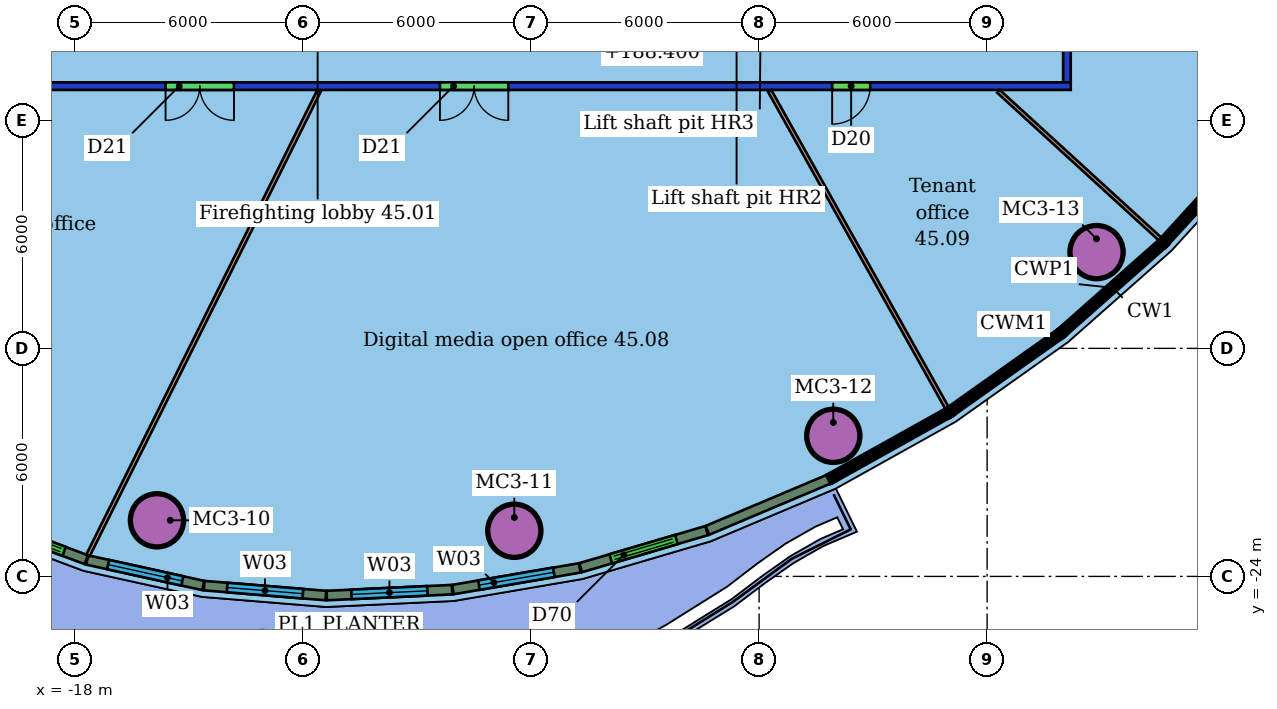
"""IFC4 building model, lengths in metres.
Left out: names, types, materials, properties, quantities, classifications, styles, units other than length and angle.
Written with IfcOpenShell. Run it as: python <this file> out.ifc"""

import sys

from ifc_helpers import new_model, si_unit, direction, frame, frame_2d, origin, origin_2d, place, context, subcontext, project, spatial, rectangle, hollow_circle, extrude, element, fill, save


model = new_model("IFC4")
c1 = context("Model", 3, precision=1e-05, world=origin(), true_north=direction((0.0, 1.0)))
c2 = subcontext(c1, "Body", "Model", "MODEL_VIEW")
j1 = project(units=[si_unit("LENGTHUNIT", "METRE"), si_unit("PLANEANGLEUNIT", "RADIAN")], contexts=[c1])
p1 = place(None, origin())
s1 = spatial("IfcSite", under=j1, at=p1, CompositionType="ELEMENT")
p2 = place(p1, origin())
s2 = spatial("IfcBuilding", under=s1, at=p2, CompositionType="ELEMENT")
p3 = place(p2, frame((0.0, 0.0, 186.6)))
s3 = spatial("IfcBuildingStorey", under=s2, at=p3, CompositionType="ELEMENT", Elevation=186.6)
for number, where, z_axis, x_axis in (
    (1, (-15.845, -22.524, 0.0), (0.0, 0.0, 1.0), (1.0, 0.0, 0.0)),
    (2, (-6.442, -22.8, 0.0), (0.0, 0.0, 1.0), (1.0, 0.0, 0.0)),
    (3, (1.952, -20.301, 0.0), (0.0, 0.0, 1.0), (1.0, 0.0, 0.0)),
    (4, (8.879, -15.467, 0.0), (0.0, 0.0, 1.0), (1.0, 0.0, 0.0)),
):
    element("IfcColumn", number, at=place(p3, frame(where, z_axis=z_axis, x_axis=x_axis)), inside=s3, PredefinedType="COLUMN", context=c2, shape_type="SweptSolid", body=[
        extrude(hollow_circle(Radius=0.7, WallThickness=0.05, at=origin_2d()), origin(), (0.0, 0.0, 1.0), 3.4),
    ])
p4 = place(p3, frame((8.2, -11.1, 0.0), z_axis=(0.0, 0.0, 1.0), x_axis=(-1.0, 0.0, 0.0)))
e5 = element("IfcWall", 5, at=p4, inside=s3, PredefinedType="PARTITIONING", context=c2, shape_type="SweptSolid", body=[
    extrude(rectangle(XDim=28.4, YDim=0.2, at=frame_2d((14.2, 0.0))), origin(), (0.0, 0.0, 1.0), 3.0),
])
p5 = place(p4, frame((22.019, 0.0, 0.0)))
e6 = element("IfcOpeningElement", 6, at=p5, cuts=e5, PredefinedType="OPENING", context=c2, shape_type="SweptSolid", body=[
    extrude(rectangle(XDim=1.8, YDim=2.1, at=frame_2d((0.9, 1.05))), frame((0.0, 0.11, 0.0), z_axis=(0.0, -1.0, 0.0), x_axis=(1.0, 0.0, 0.0)), (0.0, 0.0, 1.0), 0.22),
])
p6 = place(p4, frame((14.8, 0.0, 0.0)))
e7 = element("IfcOpeningElement", 7, at=p6, cuts=e5, PredefinedType="OPENING", context=c2, shape_type="SweptSolid", body=[
    extrude(rectangle(XDim=1.8, YDim=2.1, at=frame_2d((0.9, 1.05))), frame((0.0, 0.11, 0.0), z_axis=(0.0, -1.0, 0.0), x_axis=(1.0, 0.0, 0.0)), (0.0, 0.0, 1.0), 0.22),
])
p7 = place(p4, frame((5.278, 0.0, 0.0)))
e8 = element("IfcOpeningElement", 8, at=p7, cuts=e5, PredefinedType="OPENING", context=c2, shape_type="SweptSolid", body=[
    extrude(rectangle(XDim=1.0, YDim=2.1, at=frame_2d((0.5, 1.05))), frame((0.0, 0.11, 0.0), z_axis=(0.0, -1.0, 0.0), x_axis=(1.0, 0.0, 0.0)), (0.0, 0.0, 1.0), 0.22),
])
p8 = place(p3, frame((8.1, 11.0, 0.0), z_axis=(0.0, 0.0, 1.0), x_axis=(0.0, -1.0, 0.0)))
e9 = element("IfcWall", 9, at=p8, inside=s3, PredefinedType="PARTITIONING", context=c2, shape_type="SweptSolid", body=[
    extrude(rectangle(XDim=22.0, YDim=0.2, at=frame_2d((11.0, 0.0))), origin(), (0.0, 0.0, 1.0), 3.0),
])
p9 = place(p8, frame((11.641, 0.0, 0.0)))
e10 = element("IfcOpeningElement", 10, at=p9, cuts=e9, PredefinedType="OPENING", context=c2, shape_type="SweptSolid", body=[
    extrude(rectangle(XDim=1.8, YDim=2.1, at=frame_2d((0.9, 1.05))), frame((0.0, 0.11, 0.0), z_axis=(0.0, -1.0, 0.0), x_axis=(1.0, 0.0, 0.0)), (0.0, 0.0, 1.0), 0.22),
])
p10 = place(p8, frame((5.099, 0.0, 0.0)))
e11 = element("IfcOpeningElement", 11, at=p10, cuts=e9, PredefinedType="OPENING", context=c2, shape_type="SweptSolid", body=[
    extrude(rectangle(XDim=1.0, YDim=2.1, at=frame_2d((0.5, 1.05))), frame((0.0, 0.11, 0.0), z_axis=(0.0, -1.0, 0.0), x_axis=(1.0, 0.0, 0.0)), (0.0, 0.0, 1.0), 0.22),
])
p11 = place(p3, frame((-17.659, -23.445, 0.0), z_axis=(0.0, 0.0, 1.0), x_axis=(0.445259511275, 0.8954015678, 0.0)))
e12 = element("IfcWall", 12, at=p11, inside=s3, PredefinedType="PARTITIONING", context=c2, shape_type="SweptSolid", body=[
    extrude(rectangle(XDim=13.651, YDim=0.1, at=frame_2d((6.825, 0.0))), origin(), (0.0, 0.0, 1.0), 3.4),
])
p12 = place(p3, frame((4.945, -19.571, 0.0), z_axis=(0.0, 0.0, 1.0), x_axis=(-0.488111992878, 0.872781004839, 0.0)))
e13 = element("IfcWall", 13, at=p12, inside=s3, PredefinedType="PARTITIONING", context=c2, shape_type="SweptSolid", body=[
    extrude(rectangle(XDim=9.563, YDim=0.1, at=frame_2d((4.782, 0.0))), origin(), (0.0, 0.0, 1.0), 3.4),
])
p13 = place(p3, frame((10.555, -15.125, 0.0), z_axis=(0.0, 0.0, 1.0), x_axis=(-0.738257150839, 0.674519369058, 0.0)))
e14 = element("IfcWall", 14, at=p13, inside=s3, PredefinedType="PARTITIONING", context=c2, shape_type="SweptSolid", body=[
    extrude(rectangle(XDim=5.765, YDim=0.1, at=frame_2d((2.882, 0.0))), origin(), (0.0, 0.0, 1.0), 3.4),
])
p14 = place(p3, frame((-20.558, -22.491, 0.0), z_axis=(0.0, 0.0, 1.0), x_axis=(0.936302820001, -0.351193720413, 0.0)))
e15 = element("IfcWall", 15, at=p14, inside=s3, PredefinedType="SOLIDWALL", context=c2, shape_type="SweptSolid", body=[
    extrude(rectangle(XDim=3.046, YDim=0.25, at=frame_2d((1.523, 0.0))), origin(), (0.0, 0.0, 1.0), 3.05),
])
p15 = place(p14, frame((0.623, 0.0, 0.0)))
e16 = element("IfcOpeningElement", 16, at=p15, cuts=e15, PredefinedType="OPENING", context=c2, shape_type="SweptSolid", body=[
    extrude(rectangle(XDim=1.8, YDim=2.4, at=frame_2d((0.9, 1.2))), frame((0.0, 0.135, 0.0), z_axis=(0.0, -1.0, 0.0), x_axis=(1.0, 0.0, 0.0)), (0.0, 0.0, 1.0), 0.27),
])
p16 = place(p3, frame((-17.681, -23.568, 0.0), z_axis=(0.0, 0.0, 1.0), x_axis=(0.976666093786, -0.214763454175, 0.0)))
e17 = element("IfcWall", 17, at=p16, inside=s3, PredefinedType="SOLIDWALL", context=c2, shape_type="SweptSolid", body=[
    extrude(rectangle(XDim=3.126, YDim=0.25, at=frame_2d((1.563, 0.0))), origin(), (0.0, 0.0, 1.0), 3.05),
])
p17 = place(p16, frame((0.563, 0.0, 0.9)))
e18 = element("IfcOpeningElement", 18, at=p17, cuts=e17, PredefinedType="OPENING", context=c2, shape_type="SweptSolid", body=[
    extrude(rectangle(XDim=2.0, YDim=2.1, at=frame_2d((1.0, 1.05))), frame((0.0, 0.135, 0.0), z_axis=(0.0, -1.0, 0.0), x_axis=(1.0, 0.0, 0.0)), (0.0, 0.0, 1.0), 0.27),
])
p18 = place(p3, frame((-14.604, -24.243, 0.0), z_axis=(0.0, 0.0, 1.0), x_axis=(0.996696549615, -0.081215688051, 0.0)))
e19 = element("IfcWall", 19, at=p18, inside=s3, PredefinedType="SOLIDWALL", context=c2, shape_type="SweptSolid", body=[
    extrude(rectangle(XDim=3.213, YDim=0.25, at=frame_2d((1.607, 0.0))), origin(), (0.0, 0.0, 1.0), 3.05),
])
p19 = place(p18, frame((0.607, 0.0, 0.9)))
e20 = element("IfcOpeningElement", 20, at=p19, cuts=e19, PredefinedType="OPENING", context=c2, shape_type="SweptSolid", body=[
    extrude(rectangle(XDim=2.0, YDim=2.1, at=frame_2d((1.0, 1.05))), frame((0.0, 0.135, 0.0), z_axis=(0.0, -1.0, 0.0), x_axis=(1.0, 0.0, 0.0)), (0.0, 0.0, 1.0), 0.27),
])
p20 = place(p3, frame((-11.377, -24.504, 0.0), z_axis=(0.0, 0.0, 1.0), x_axis=(0.998890112475, 0.047101413994, 0.0)))
e21 = element("IfcWall", 21, at=p20, inside=s3, PredefinedType="SOLIDWALL", context=c2, shape_type="SweptSolid", body=[
    extrude(rectangle(XDim=3.302, YDim=0.25, at=frame_2d((1.651, 0.0))), origin(), (0.0, 0.0, 1.0), 3.05),
])
p21 = place(p20, frame((0.651, 0.0, 0.9)))
e22 = element("IfcOpeningElement", 22, at=p21, cuts=e21, PredefinedType="OPENING", context=c2, shape_type="SweptSolid", body=[
    extrude(rectangle(XDim=2.0, YDim=2.1, at=frame_2d((1.0, 1.05))), frame((0.0, 0.135, 0.0), z_axis=(0.0, -1.0, 0.0), x_axis=(1.0, 0.0, 0.0)), (0.0, 0.0, 1.0), 0.27),
])
p22 = place(p3, frame((-8.056, -24.346, 0.0), z_axis=(0.0, 0.0, 1.0), x_axis=(0.985711019597, 0.168445201314, 0.0)))
e23 = element("IfcWall", 23, at=p22, inside=s3, PredefinedType="SOLIDWALL", context=c2, shape_type="SweptSolid", body=[
    extrude(rectangle(XDim=3.384, YDim=0.25, at=frame_2d((1.692, 0.0))), origin(), (0.0, 0.0, 1.0), 3.05),
])
p23 = place(p22, frame((0.692, 0.0, 0.9)))
e24 = element("IfcOpeningElement", 24, at=p23, cuts=e23, PredefinedType="OPENING", context=c2, shape_type="SweptSolid", body=[
    extrude(rectangle(XDim=2.0, YDim=2.1, at=frame_2d((1.0, 1.05))), frame((0.0, 0.135, 0.0), z_axis=(0.0, -1.0, 0.0), x_axis=(1.0, 0.0, 0.0)), (0.0, 0.0, 1.0), 0.27),
])
p24 = place(p3, frame((-4.698, -23.771, 0.0), z_axis=(0.0, 0.0, 1.0), x_axis=(0.959327255186, 0.28229632916, 0.0)))
e25 = element("IfcWall", 25, at=p24, inside=s3, PredefinedType="SOLIDWALL", context=c2, shape_type="SweptSolid", body=[
    extrude(rectangle(XDim=3.457, YDim=0.25, at=frame_2d((1.729, 0.0))), origin(), (0.0, 0.0, 1.0), 3.05),
])
p25 = place(p24, frame((0.828, 0.0, 0.0)))
e26 = element("IfcOpeningElement", 26, at=p25, cuts=e25, PredefinedType="OPENING", context=c2, shape_type="SweptSolid", body=[
    extrude(rectangle(XDim=1.8, YDim=2.4, at=frame_2d((0.9, 1.2))), frame((0.0, 0.135, 0.0), z_axis=(0.0, -1.0, 0.0), x_axis=(1.0, 0.0, 0.0)), (0.0, 0.0, 1.0), 0.27),
])
p26 = place(p3, frame((-1.361, -22.788, 0.0), z_axis=(0.0, 0.0, 1.0), x_axis=(0.921468444672, 0.388453221733, 0.0)))
e27 = element("IfcWall", 27, at=p26, inside=s3, PredefinedType="SOLIDWALL", context=c2, shape_type="SweptSolid", body=[
    extrude(rectangle(XDim=3.47, YDim=0.25, at=frame_2d((1.735, 0.0))), origin(), (0.0, 0.0, 1.0), 3.05),
])
p27 = place(p5, origin())
e28 = element("IfcDoor", 28, at=p27, inside=s3, OperationType="DOUBLE_DOOR_SINGLE_SWING", PredefinedType="DOOR", context=c2, shape_type="SweptSolid", body=[
    extrude(rectangle(XDim=1.8, YDim=2.1, at=frame_2d((0.9, 1.05))), frame((0.0, 0.025, 0.0), z_axis=(0.0, -1.0, 0.0), x_axis=(1.0, 0.0, 0.0)), (0.0, 0.0, 1.0), 0.05),
])
fill(e6, e28)
p28 = place(p6, origin())
e29 = element("IfcDoor", 29, at=p28, inside=s3, OperationType="DOUBLE_DOOR_SINGLE_SWING", PredefinedType="DOOR", context=c2, shape_type="SweptSolid", body=[
    extrude(rectangle(XDim=1.8, YDim=2.1, at=frame_2d((0.9, 1.05))), frame((0.0, 0.025, 0.0), z_axis=(0.0, -1.0, 0.0), x_axis=(1.0, 0.0, 0.0)), (0.0, 0.0, 1.0), 0.05),
])
fill(e7, e29)
p29 = place(p7, origin())
e30 = element("IfcDoor", 30, at=p29, inside=s3, OperationType="SINGLE_SWING_RIGHT", PredefinedType="DOOR", context=c2, shape_type="SweptSolid", body=[
    extrude(rectangle(XDim=1.0, YDim=2.1, at=frame_2d((0.5, 1.05))), frame((0.0, 0.025, 0.0), z_axis=(0.0, -1.0, 0.0), x_axis=(1.0, 0.0, 0.0)), (0.0, 0.0, 1.0), 0.05),
])
fill(e8, e30)
p30 = place(p15, origin())
e31 = element("IfcDoor", 31, at=p30, inside=s3, OperationType="DOUBLE_DOOR_SLIDING", PredefinedType="DOOR", context=c2, shape_type="SweptSolid", body=[
    extrude(rectangle(XDim=1.8, YDim=2.4, at=frame_2d((0.9, 1.2))), frame((0.0, 0.025, 0.0), z_axis=(0.0, -1.0, 0.0), x_axis=(1.0, 0.0, 0.0)), (0.0, 0.0, 1.0), 0.05),
])
fill(e16, e31)
p31 = place(p17, origin())
e32 = element("IfcWindow", 32, at=p31, inside=s3, PartitioningType="SINGLE_PANEL", PredefinedType="WINDOW", context=c2, shape_type="SweptSolid", body=[
    extrude(rectangle(XDim=2.0, YDim=2.1, at=frame_2d((1.0, 1.05))), frame((0.0, 0.03, 0.0), z_axis=(0.0, -1.0, 0.0), x_axis=(1.0, 0.0, 0.0)), (0.0, 0.0, 1.0), 0.06),
])
fill(e18, e32)
p32 = place(p19, origin())
e33 = element("IfcWindow", 33, at=p32, inside=s3, PartitioningType="SINGLE_PANEL", PredefinedType="WINDOW", context=c2, shape_type="SweptSolid", body=[
    extrude(rectangle(XDim=2.0, YDim=2.1, at=frame_2d((1.0, 1.05))), frame((0.0, 0.03, 0.0), z_axis=(0.0, -1.0, 0.0), x_axis=(1.0, 0.0, 0.0)), (0.0, 0.0, 1.0), 0.06),
])
fill(e20, e33)
p33 = place(p21, origin())
e34 = element("IfcWindow", 34, at=p33, inside=s3, PartitioningType="SINGLE_PANEL", PredefinedType="WINDOW", context=c2, shape_type="SweptSolid", body=[
    extrude(rectangle(XDim=2.0, YDim=2.1, at=frame_2d((1.0, 1.05))), frame((0.0, 0.03, 0.0), z_axis=(0.0, -1.0, 0.0), x_axis=(1.0, 0.0, 0.0)), (0.0, 0.0, 1.0), 0.06),
])
fill(e22, e34)
p34 = place(p23, origin())
e35 = element("IfcWindow", 35, at=p34, inside=s3, PartitioningType="SINGLE_PANEL", PredefinedType="WINDOW", context=c2, shape_type="SweptSolid", body=[
    extrude(rectangle(XDim=2.0, YDim=2.1, at=frame_2d((1.0, 1.05))), frame((0.0, 0.03, 0.0), z_axis=(0.0, -1.0, 0.0), x_axis=(1.0, 0.0, 0.0)), (0.0, 0.0, 1.0), 0.06),
])
fill(e24, e35)
p35 = place(p25, origin())
e36 = element("IfcDoor", 36, at=p35, inside=s3, OperationType="DOUBLE_DOOR_SLIDING", PredefinedType="DOOR", context=c2, shape_type="SweptSolid", body=[
    extrude(rectangle(XDim=1.8, YDim=2.4, at=frame_2d((0.9, 1.2))), frame((0.0, 0.025, 0.0), z_axis=(0.0, -1.0, 0.0), x_axis=(1.0, 0.0, 0.0)), (0.0, 0.0, 1.0), 0.05),
])
fill(e26, e36)
save(model, sys.argv[1])
